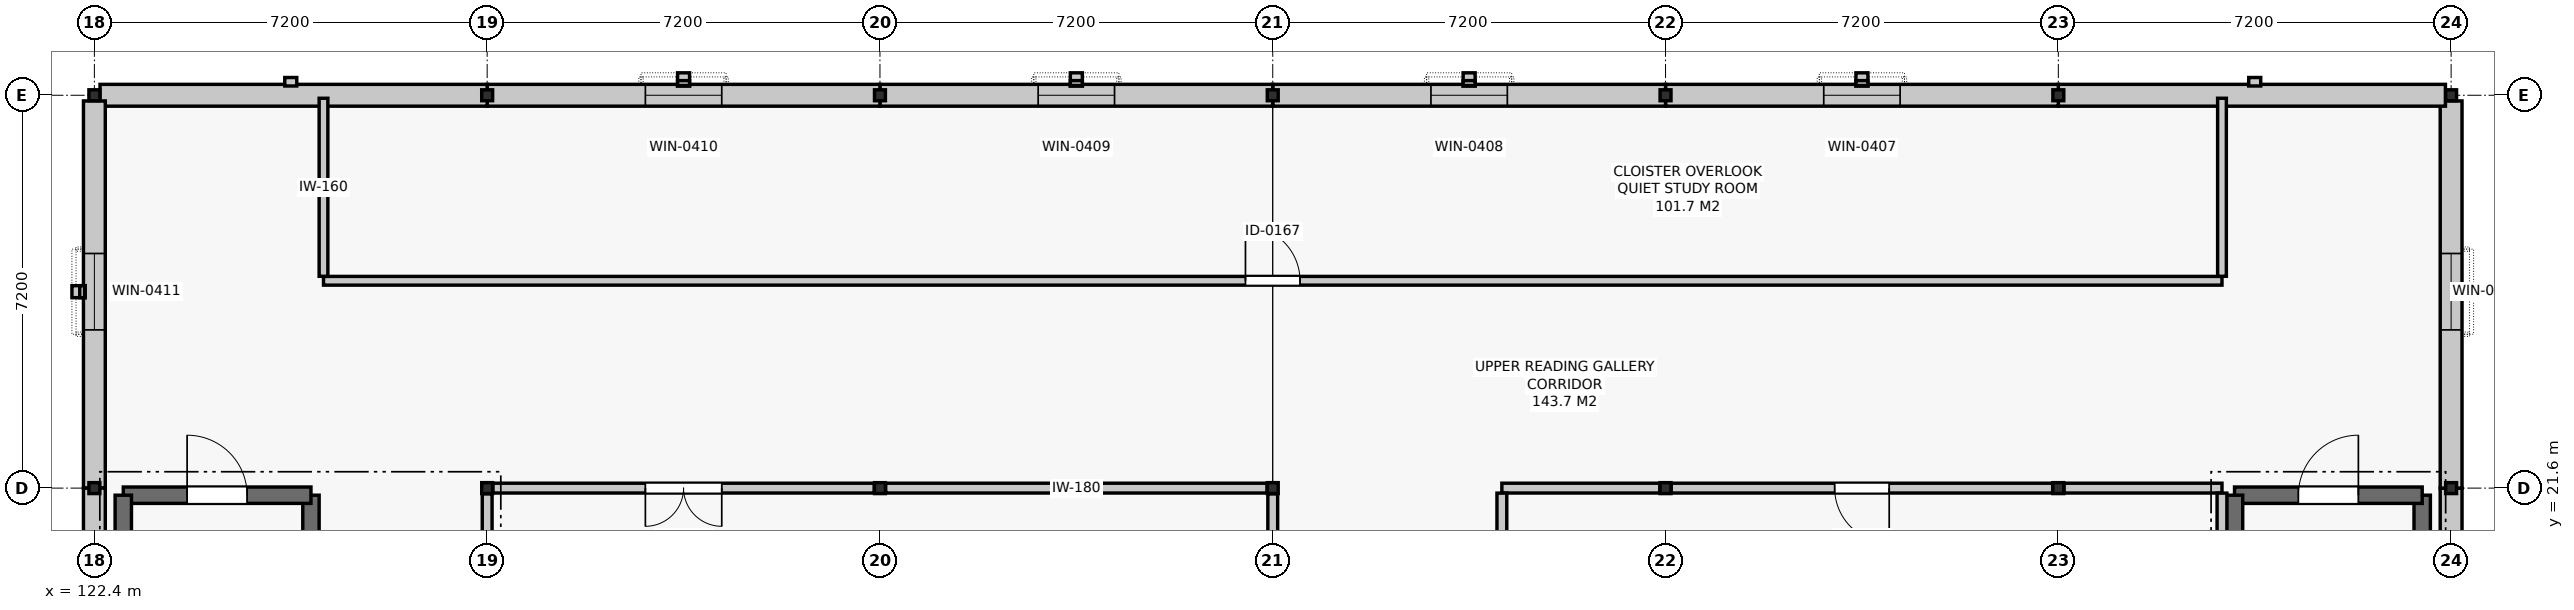
"""IFC4 building model, lengths in metres.
Left out: names, types, materials, properties, quantities, classifications, styles, units other than length and angle.
Written with IfcOpenShell. Run it as: python <this file> out.ifc"""

import sys

from ifc_helpers import new_model, si_unit, direction, frame, frame_2d, origin, origin_2d, place, context, subcontext, project, spatial, rectangle, i_section, extrude, element, fill, save


model = new_model("IFC4")
c1 = context("Model", 3, precision=1e-05, world=origin(), true_north=direction((0.0, 1.0)))
c2 = subcontext(c1, "Body", "Model", "MODEL_VIEW")
j1 = project(units=[si_unit("LENGTHUNIT", "METRE"), si_unit("PLANEANGLEUNIT", "RADIAN")], contexts=[c1])
p1 = place(None, origin())
s1 = spatial("IfcSite", under=j1, at=p1, CompositionType="ELEMENT")
p2 = place(p1, origin())
s2 = spatial("IfcBuilding", under=s1, at=p2, CompositionType="ELEMENT")
p3 = place(p2, frame((0.0, 0.0, 14.4)))
s3 = spatial("IfcBuildingStorey", under=s2, at=p3, CompositionType="ELEMENT", Elevation=14.4)
for number, where, z_axis, x_axis in (
    (1, (122.4, 21.6, 0.0), (0.0, 0.0, 1.0), (1.0, 0.0, 0.0)),
    (2, (122.4, 28.8, 0.0), (0.0, 0.0, 1.0), (1.0, 0.0, 0.0)),
    (3, (129.6, 21.6, 0.0), (0.0, 0.0, 1.0), (1.0, 0.0, 0.0)),
    (4, (129.6, 28.8, 0.0), (0.0, 0.0, 1.0), (1.0, 0.0, 0.0)),
    (5, (136.8, 21.6, 0.0), (0.0, 0.0, 1.0), (1.0, 0.0, 0.0)),
    (6, (136.8, 28.8, 0.0), (0.0, 0.0, 1.0), (1.0, 0.0, 0.0)),
    (7, (144.0, 21.6, 0.0), (0.0, 0.0, 1.0), (1.0, 0.0, 0.0)),
    (8, (144.0, 28.8, 0.0), (0.0, 0.0, 1.0), (1.0, 0.0, 0.0)),
    (9, (151.2, 21.6, 0.0), (0.0, 0.0, 1.0), (1.0, 0.0, 0.0)),
    (10, (151.2, 28.8, 0.0), (0.0, 0.0, 1.0), (1.0, 0.0, 0.0)),
    (11, (158.4, 21.6, 0.0), (0.0, 0.0, 1.0), (1.0, 0.0, 0.0)),
    (12, (158.4, 28.8, 0.0), (0.0, 0.0, 1.0), (1.0, 0.0, 0.0)),
    (13, (165.6, 21.6, 0.0), (0.0, 0.0, 1.0), (1.0, 0.0, 0.0)),
    (14, (165.6, 28.8, 0.0), (0.0, 0.0, 1.0), (1.0, 0.0, 0.0)),
):
    element("IfcColumn", number, at=place(p3, frame(where, z_axis=z_axis, x_axis=x_axis)), inside=s3, PredefinedType="COLUMN", context=c2, shape_type="SweptSolid", body=[
        extrude(i_section(OverallWidth=0.2, OverallDepth=0.2, WebThickness=0.009, FlangeThickness=0.015, FilletRadius=0.018, at=origin_2d()), origin(), (0.0, 0.0, 1.0), 4.2),
    ])
p4 = place(p3, frame((165.6, 14.4, 0.0), z_axis=(0.0, 0.0, 1.0), x_axis=(0.0, 1.0, 0.0)))
e15 = element("IfcWall", 15, at=p4, inside=s3, PredefinedType="SOLIDWALL", context=c2, shape_type="SweptSolid", body=[
    extrude(rectangle(XDim=7.2, YDim=0.4, at=frame_2d((3.6, 0.0))), origin(), (0.0, 0.0, 1.0), 3.24),
])
p5 = place(p3, frame((165.6, 21.6, 0.0), z_axis=(0.0, 0.0, 1.0), x_axis=(0.0, 1.0, 0.0)))
e16 = element("IfcWall", 16, at=p5, inside=s3, PredefinedType="SOLIDWALL", context=c2, shape_type="SweptSolid", body=[
    extrude(rectangle(XDim=7.096, YDim=0.4, at=frame_2d((3.548, 0.0))), origin(), (0.0, 0.0, 1.0), 3.24),
])
p6 = place(p5, frame((2.9, 0.0, 0.95)))
e17 = element("IfcOpeningElement", 17, at=p6, cuts=e16, PredefinedType="OPENING", context=c2, shape_type="SweptSolid", body=[
    extrude(rectangle(XDim=1.4, YDim=1.85, at=frame_2d((0.7, 0.925))), frame((0.0, 0.212, 0.0), z_axis=(0.0, -1.0, 0.0), x_axis=(1.0, 0.0, 0.0)), (0.0, 0.0, 1.0), 0.424),
])
p7 = place(p3, frame((165.496, 28.8, 0.0), z_axis=(0.0, 0.0, 1.0), x_axis=(-1.0, 0.0, 0.0)))
e18 = element("IfcWall", 18, at=p7, inside=s3, PredefinedType="SOLIDWALL", context=c2, shape_type="SweptSolid", body=[
    extrude(rectangle(XDim=7.096, YDim=0.4, at=frame_2d((3.548, 0.0))), origin(), (0.0, 0.0, 1.0), 3.24),
])
p8 = place(p3, frame((158.4, 28.8, 0.0), z_axis=(0.0, 0.0, 1.0), x_axis=(-1.0, 0.0, 0.0)))
e19 = element("IfcWall", 19, at=p8, inside=s3, PredefinedType="SOLIDWALL", context=c2, shape_type="SweptSolid", body=[
    extrude(rectangle(XDim=7.2, YDim=0.4, at=frame_2d((3.6, 0.0))), origin(), (0.0, 0.0, 1.0), 3.24),
])
p9 = place(p8, frame((2.9, 0.0, 0.95)))
e20 = element("IfcOpeningElement", 20, at=p9, cuts=e19, PredefinedType="OPENING", context=c2, shape_type="SweptSolid", body=[
    extrude(rectangle(XDim=1.4, YDim=1.85, at=frame_2d((0.7, 0.925))), frame((0.0, 0.212, 0.0), z_axis=(0.0, -1.0, 0.0), x_axis=(1.0, 0.0, 0.0)), (0.0, 0.0, 1.0), 0.424),
])
p10 = place(p3, frame((151.2, 28.8, 0.0), z_axis=(0.0, 0.0, 1.0), x_axis=(-1.0, 0.0, 0.0)))
e21 = element("IfcWall", 21, at=p10, inside=s3, PredefinedType="SOLIDWALL", context=c2, shape_type="SweptSolid", body=[
    extrude(rectangle(XDim=7.2, YDim=0.4, at=frame_2d((3.6, 0.0))), origin(), (0.0, 0.0, 1.0), 3.24),
])
p11 = place(p10, frame((2.9, 0.0, 0.95)))
e22 = element("IfcOpeningElement", 22, at=p11, cuts=e21, PredefinedType="OPENING", context=c2, shape_type="SweptSolid", body=[
    extrude(rectangle(XDim=1.4, YDim=1.85, at=frame_2d((0.7, 0.925))), frame((0.0, 0.212, 0.0), z_axis=(0.0, -1.0, 0.0), x_axis=(1.0, 0.0, 0.0)), (0.0, 0.0, 1.0), 0.424),
])
p12 = place(p3, frame((144.0, 28.8, 0.0), z_axis=(0.0, 0.0, 1.0), x_axis=(-1.0, 0.0, 0.0)))
e23 = element("IfcWall", 23, at=p12, inside=s3, PredefinedType="SOLIDWALL", context=c2, shape_type="SweptSolid", body=[
    extrude(rectangle(XDim=7.2, YDim=0.4, at=frame_2d((3.6, 0.0))), origin(), (0.0, 0.0, 1.0), 3.24),
])
p13 = place(p12, frame((2.9, 0.0, 0.95)))
e24 = element("IfcOpeningElement", 24, at=p13, cuts=e23, PredefinedType="OPENING", context=c2, shape_type="SweptSolid", body=[
    extrude(rectangle(XDim=1.4, YDim=1.85, at=frame_2d((0.7, 0.925))), frame((0.0, 0.212, 0.0), z_axis=(0.0, -1.0, 0.0), x_axis=(1.0, 0.0, 0.0)), (0.0, 0.0, 1.0), 0.424),
])
p14 = place(p3, frame((136.8, 28.8, 0.0), z_axis=(0.0, 0.0, 1.0), x_axis=(-1.0, 0.0, 0.0)))
e25 = element("IfcWall", 25, at=p14, inside=s3, PredefinedType="SOLIDWALL", context=c2, shape_type="SweptSolid", body=[
    extrude(rectangle(XDim=7.2, YDim=0.4, at=frame_2d((3.6, 0.0))), origin(), (0.0, 0.0, 1.0), 3.24),
])
p15 = place(p14, frame((2.9, 0.0, 0.95)))
e26 = element("IfcOpeningElement", 26, at=p15, cuts=e25, PredefinedType="OPENING", context=c2, shape_type="SweptSolid", body=[
    extrude(rectangle(XDim=1.4, YDim=1.85, at=frame_2d((0.7, 0.925))), frame((0.0, 0.212, 0.0), z_axis=(0.0, -1.0, 0.0), x_axis=(1.0, 0.0, 0.0)), (0.0, 0.0, 1.0), 0.424),
])
p16 = place(p3, frame((129.6, 28.8, 0.0), z_axis=(0.0, 0.0, 1.0), x_axis=(-1.0, 0.0, 0.0)))
e27 = element("IfcWall", 27, at=p16, inside=s3, PredefinedType="SOLIDWALL", context=c2, shape_type="SweptSolid", body=[
    extrude(rectangle(XDim=7.096, YDim=0.4, at=frame_2d((3.548, 0.0))), origin(), (0.0, 0.0, 1.0), 3.24),
])
p17 = place(p3, frame((122.4, 28.696, 0.0), z_axis=(0.0, 0.0, 1.0), x_axis=(0.0, -1.0, 0.0)))
e28 = element("IfcWall", 28, at=p17, inside=s3, PredefinedType="SOLIDWALL", context=c2, shape_type="SweptSolid", body=[
    extrude(rectangle(XDim=7.096, YDim=0.4, at=frame_2d((3.548, 0.0))), origin(), (0.0, 0.0, 1.0), 3.24),
])
p18 = place(p17, frame((2.796, 0.0, 0.95)))
e29 = element("IfcOpeningElement", 29, at=p18, cuts=e28, PredefinedType="OPENING", context=c2, shape_type="SweptSolid", body=[
    extrude(rectangle(XDim=1.4, YDim=1.85, at=frame_2d((0.7, 0.925))), frame((0.0, 0.212, 0.0), z_axis=(0.0, -1.0, 0.0), x_axis=(1.0, 0.0, 0.0)), (0.0, 0.0, 1.0), 0.424),
])
p19 = place(p3, frame((122.4, 21.6, 0.0), z_axis=(0.0, 0.0, 1.0), x_axis=(0.0, -1.0, 0.0)))
e30 = element("IfcWall", 30, at=p19, inside=s3, PredefinedType="SOLIDWALL", context=c2, shape_type="SweptSolid", body=[
    extrude(rectangle(XDim=7.2, YDim=0.4, at=frame_2d((3.6, 0.0))), origin(), (0.0, 0.0, 1.0), 3.24),
])
p20 = place(p19, frame((2.9, 0.0, 0.95)))
e31 = element("IfcOpeningElement", 31, at=p20, cuts=e30, PredefinedType="OPENING", context=c2, shape_type="SweptSolid", body=[
    extrude(rectangle(XDim=1.4, YDim=1.85, at=frame_2d((0.7, 0.925))), frame((0.0, 0.212, 0.0), z_axis=(0.0, -1.0, 0.0), x_axis=(1.0, 0.0, 0.0)), (0.0, 0.0, 1.0), 0.424),
])
p21 = place(p3, frame((126.37, 14.43, 0.0), z_axis=(0.0, 0.0, 1.0), x_axis=(0.0, 1.0, 0.0)))
e32 = element("IfcWall", 32, at=p21, inside=s3, PredefinedType="SHEAR", context=c2, shape_type="SweptSolid", body=[
    extrude(rectangle(XDim=7.04, YDim=0.3, at=frame_2d((3.52, 0.0))), origin(), (0.0, 0.0, 1.0), 3.96),
])
p22 = place(p3, frame((126.37, 21.47, 0.0), z_axis=(0.0, 0.0, 1.0), x_axis=(-1.0, 0.0, 0.0)))
e33 = element("IfcWall", 33, at=p22, inside=s3, PredefinedType="SHEAR", context=c2, shape_type="SweptSolid", body=[
    extrude(rectangle(XDim=3.44, YDim=0.3, at=frame_2d((1.72, 0.0))), origin(), (0.0, 0.0, 1.0), 3.96),
])
p23 = place(p22, frame((1.17, 0.0, 0.0)))
e34 = element("IfcOpeningElement", 34, at=p23, cuts=e33, PredefinedType="OPENING", context=c2, shape_type="SweptSolid", body=[
    extrude(rectangle(XDim=1.1, YDim=2.15, at=frame_2d((0.55, 1.075))), frame((0.0, 0.162, 0.0), z_axis=(0.0, -1.0, 0.0), x_axis=(1.0, 0.0, 0.0)), (0.0, 0.0, 1.0), 0.324),
])
for number, where, z_axis, x_axis in (
    (35, (122.93, 21.47, 0.0), (0.0, 0.0, 1.0), (0.0, -1.0, 0.0)),
    (36, (165.07, 14.43, 0.0), (0.0, 0.0, 1.0), (0.0, 1.0, 0.0)),
):
    element("IfcWall", number, at=place(p3, frame(where, z_axis=z_axis, x_axis=x_axis)), inside=s3, PredefinedType="SHEAR", context=c2, shape_type="SweptSolid", body=[
        extrude(rectangle(XDim=7.04, YDim=0.3, at=frame_2d((3.52, 0.0))), origin(), (0.0, 0.0, 1.0), 3.96),
    ])
p24 = place(p3, frame((165.07, 21.47, 0.0), z_axis=(0.0, 0.0, 1.0), x_axis=(-1.0, 0.0, 0.0)))
e37 = element("IfcWall", 37, at=p24, inside=s3, PredefinedType="SHEAR", context=c2, shape_type="SweptSolid", body=[
    extrude(rectangle(XDim=3.44, YDim=0.3, at=frame_2d((1.72, 0.0))), origin(), (0.0, 0.0, 1.0), 3.96),
])
p25 = place(p24, frame((1.17, 0.0, 0.0)))
e38 = element("IfcOpeningElement", 38, at=p25, cuts=e37, PredefinedType="OPENING", context=c2, shape_type="SweptSolid", body=[
    extrude(rectangle(XDim=1.1, YDim=2.15, at=frame_2d((0.55, 1.075))), frame((0.0, 0.162, 0.0), z_axis=(0.0, -1.0, 0.0), x_axis=(1.0, 0.0, 0.0)), (0.0, 0.0, 1.0), 0.324),
])
p26 = place(p3, frame((161.63, 21.47, 0.0), z_axis=(0.0, 0.0, 1.0), x_axis=(0.0, -1.0, 0.0)))
e39 = element("IfcWall", 39, at=p26, inside=s3, PredefinedType="SHEAR", context=c2, shape_type="SweptSolid", body=[
    extrude(rectangle(XDim=7.04, YDim=0.3, at=frame_2d((3.52, 0.0))), origin(), (0.0, 0.0, 1.0), 3.96),
])
p27 = place(p3, frame((129.704, 21.6, 0.0), z_axis=(0.0, 0.0, 1.0), x_axis=(1.0, 0.0, 0.0)))
e40 = element("IfcWall", 40, at=p27, inside=s3, PredefinedType="PARTITIONING", context=c2, shape_type="SweptSolid", body=[
    extrude(rectangle(XDim=6.992, YDim=0.18, at=frame_2d((3.496, 0.0))), origin(), (0.0, 0.0, 1.0), 3.245),
])
p28 = place(p27, frame((2.796, 0.0, 0.0)))
e41 = element("IfcOpeningElement", 41, at=p28, cuts=e40, PredefinedType="OPENING", context=c2, shape_type="SweptSolid", body=[
    extrude(rectangle(XDim=1.4, YDim=2.2, at=frame_2d((0.7, 1.1))), frame((0.0, 0.102, 0.0), z_axis=(0.0, -1.0, 0.0), x_axis=(1.0, 0.0, 0.0)), (0.0, 0.0, 1.0), 0.204),
])
p29 = place(p3, frame((136.904, 21.6, 0.0), z_axis=(0.0, 0.0, 1.0), x_axis=(1.0, 0.0, 0.0)))
e42 = element("IfcWall", 42, at=p29, inside=s3, PredefinedType="PARTITIONING", context=c2, shape_type="SweptSolid", body=[
    extrude(rectangle(XDim=6.992, YDim=0.18, at=frame_2d((3.496, 0.0))), origin(), (0.0, 0.0, 1.0), 3.245),
])
p30 = place(p3, frame((126.6, 25.4, 0.0), z_axis=(0.0, 0.0, 1.0), x_axis=(1.0, 0.0, 0.0)))
e43 = element("IfcWall", 43, at=p30, inside=s3, PredefinedType="PARTITIONING", context=c2, shape_type="SweptSolid", body=[
    extrude(rectangle(XDim=34.8, YDim=0.16, at=frame_2d((17.4, 0.0))), origin(), (0.0, 0.0, 1.0), 3.595),
])
p31 = place(p30, frame((16.9, 0.0, 0.0)))
e44 = element("IfcOpeningElement", 44, at=p31, cuts=e43, PredefinedType="OPENING", context=c2, shape_type="SweptSolid", body=[
    extrude(rectangle(XDim=1.0, YDim=2.15, at=frame_2d((0.5, 1.075))), frame((0.0, 0.092, 0.0), z_axis=(0.0, -1.0, 0.0), x_axis=(1.0, 0.0, 0.0)), (0.0, 0.0, 1.0), 0.184),
])
p32 = place(p3, frame((148.2, 21.6, 0.0), z_axis=(0.0, 0.0, 1.0), x_axis=(1.0, 0.0, 0.0)))
e45 = element("IfcWall", 45, at=p32, inside=s3, PredefinedType="PARTITIONING", context=c2, shape_type="SweptSolid", body=[
    extrude(rectangle(XDim=2.896, YDim=0.18, at=frame_2d((1.448, 0.0))), origin(), (0.0, 0.0, 1.0), 3.595),
])
p33 = place(p3, frame((151.304, 21.6, 0.0), z_axis=(0.0, 0.0, 1.0), x_axis=(1.0, 0.0, 0.0)))
e46 = element("IfcWall", 46, at=p33, inside=s3, PredefinedType="PARTITIONING", context=c2, shape_type="SweptSolid", body=[
    extrude(rectangle(XDim=6.992, YDim=0.18, at=frame_2d((3.496, 0.0))), origin(), (0.0, 0.0, 1.0), 3.595),
])
p34 = place(p33, frame((2.996, 0.0, 0.0)))
e47 = element("IfcOpeningElement", 47, at=p34, cuts=e46, PredefinedType="OPENING", context=c2, shape_type="SweptSolid", body=[
    extrude(rectangle(XDim=1.0, YDim=2.15, at=frame_2d((0.5, 1.075))), frame((0.0, 0.102, 0.0), z_axis=(0.0, -1.0, 0.0), x_axis=(1.0, 0.0, 0.0)), (0.0, 0.0, 1.0), 0.204),
])
p35 = place(p3, frame((158.504, 21.6, 0.0), z_axis=(0.0, 0.0, 1.0), x_axis=(1.0, 0.0, 0.0)))
e48 = element("IfcWall", 48, at=p35, inside=s3, PredefinedType="PARTITIONING", context=c2, shape_type="SweptSolid", body=[
    extrude(rectangle(XDim=2.896, YDim=0.18, at=frame_2d((1.448, 0.0))), origin(), (0.0, 0.0, 1.0), 3.595),
])
for number, where, z_axis, x_axis in (
    (49, (129.6, 14.504, 0.0), (0.0, 0.0, 1.0), (0.0, 1.0, 0.0)),
    (50, (144.0, 14.504, 0.0), (0.0, 0.0, 1.0), (0.0, 1.0, 0.0)),
):
    element("IfcWall", number, at=place(p3, frame(where, z_axis=z_axis, x_axis=x_axis)), inside=s3, PredefinedType="PARTITIONING", context=c2, shape_type="SweptSolid", body=[
        extrude(rectangle(XDim=6.992, YDim=0.18, at=frame_2d((3.496, 0.0))), origin(), (0.0, 0.0, 1.0), 3.055),
    ])
for number, where, z_axis, x_axis in (
    (51, (126.6, 25.482, 0.0), (0.0, 0.0, 1.0), (0.0, 1.0, 0.0)),
    (52, (161.4, 25.482, 0.0), (0.0, 0.0, 1.0), (0.0, 1.0, 0.0)),
):
    element("IfcWall", number, at=place(p3, frame(where, z_axis=z_axis, x_axis=x_axis)), inside=s3, PredefinedType="PARTITIONING", context=c2, shape_type="SweptSolid", body=[
        extrude(rectangle(XDim=3.263, YDim=0.16, at=frame_2d((1.632, 0.0))), origin(), (0.0, 0.0, 1.0), 3.395),
    ])
p36 = place(p3, frame((148.2, 18.077, 0.0), z_axis=(0.0, 0.0, 1.0), x_axis=(0.0, 1.0, 0.0)))
e53 = element("IfcWall", 53, at=p36, inside=s3, PredefinedType="PARTITIONING", context=c2, shape_type="SweptSolid", body=[
    extrude(rectangle(XDim=3.431, YDim=0.18, at=frame_2d((1.716, 0.0))), origin(), (0.0, 0.0, 1.0), 3.695),
])
p37 = place(p3, frame((161.4, 18.092, 0.0), z_axis=(0.0, 0.0, 1.0), x_axis=(0.0, 1.0, 0.0)))
e54 = element("IfcWall", 54, at=p37, inside=s3, PredefinedType="PARTITIONING", context=c2, shape_type="SweptSolid", body=[
    extrude(rectangle(XDim=3.416, YDim=0.18, at=frame_2d((1.708, 0.0))), origin(), (0.0, 0.0, 1.0), 3.695),
])
p38 = place(p6, origin())
e55 = element("IfcWindow", 55, at=p38, inside=s3, PartitioningType="SINGLE_PANEL", PredefinedType="WINDOW", context=c2, shape_type="SweptSolid", body=[
    extrude(rectangle(XDim=1.4, YDim=1.85, at=frame_2d((0.7, 0.925))), frame((0.0, 0.03, 0.0), z_axis=(0.0, -1.0, 0.0), x_axis=(1.0, 0.0, 0.0)), (0.0, 0.0, 1.0), 0.06),
])
fill(e17, e55)
p39 = place(p9, origin())
e56 = element("IfcWindow", 56, at=p39, inside=s3, PartitioningType="SINGLE_PANEL", PredefinedType="WINDOW", context=c2, shape_type="SweptSolid", body=[
    extrude(rectangle(XDim=1.4, YDim=1.85, at=frame_2d((0.7, 0.925))), frame((0.0, 0.03, 0.0), z_axis=(0.0, -1.0, 0.0), x_axis=(1.0, 0.0, 0.0)), (0.0, 0.0, 1.0), 0.06),
])
fill(e20, e56)
p40 = place(p11, origin())
e57 = element("IfcWindow", 57, at=p40, inside=s3, PartitioningType="SINGLE_PANEL", PredefinedType="WINDOW", context=c2, shape_type="SweptSolid", body=[
    extrude(rectangle(XDim=1.4, YDim=1.85, at=frame_2d((0.7, 0.925))), frame((0.0, 0.03, 0.0), z_axis=(0.0, -1.0, 0.0), x_axis=(1.0, 0.0, 0.0)), (0.0, 0.0, 1.0), 0.06),
])
fill(e22, e57)
p41 = place(p13, origin())
e58 = element("IfcWindow", 58, at=p41, inside=s3, PartitioningType="SINGLE_PANEL", PredefinedType="WINDOW", context=c2, shape_type="SweptSolid", body=[
    extrude(rectangle(XDim=1.4, YDim=1.85, at=frame_2d((0.7, 0.925))), frame((0.0, 0.03, 0.0), z_axis=(0.0, -1.0, 0.0), x_axis=(1.0, 0.0, 0.0)), (0.0, 0.0, 1.0), 0.06),
])
fill(e24, e58)
p42 = place(p15, origin())
e59 = element("IfcWindow", 59, at=p42, inside=s3, PartitioningType="SINGLE_PANEL", PredefinedType="WINDOW", context=c2, shape_type="SweptSolid", body=[
    extrude(rectangle(XDim=1.4, YDim=1.85, at=frame_2d((0.7, 0.925))), frame((0.0, 0.03, 0.0), z_axis=(0.0, -1.0, 0.0), x_axis=(1.0, 0.0, 0.0)), (0.0, 0.0, 1.0), 0.06),
])
fill(e26, e59)
p43 = place(p18, origin())
e60 = element("IfcWindow", 60, at=p43, inside=s3, PartitioningType="SINGLE_PANEL", PredefinedType="WINDOW", context=c2, shape_type="SweptSolid", body=[
    extrude(rectangle(XDim=1.4, YDim=1.85, at=frame_2d((0.7, 0.925))), frame((0.0, 0.03, 0.0), z_axis=(0.0, -1.0, 0.0), x_axis=(1.0, 0.0, 0.0)), (0.0, 0.0, 1.0), 0.06),
])
fill(e29, e60)
p44 = place(p23, frame((1.1, 0.0, 0.0), z_axis=(0.0, 0.0, 1.0), x_axis=(-1.0, 0.0, 0.0)))
e61 = element("IfcDoor", 61, at=p44, inside=s3, OperationType="SINGLE_SWING_LEFT", PredefinedType="DOOR", context=c2, shape_type="SweptSolid", body=[
    extrude(rectangle(XDim=1.1, YDim=2.15, at=frame_2d((0.55, 1.075))), frame((0.0, 0.025, 0.0), z_axis=(0.0, -1.0, 0.0), x_axis=(1.0, 0.0, 0.0)), (0.0, 0.0, 1.0), 0.05),
])
fill(e34, e61)
p45 = place(p25, frame((1.1, 0.0, 0.0), z_axis=(0.0, 0.0, 1.0), x_axis=(-1.0, 0.0, 0.0)))
e62 = element("IfcDoor", 62, at=p45, inside=s3, OperationType="SINGLE_SWING_RIGHT", PredefinedType="DOOR", context=c2, shape_type="SweptSolid", body=[
    extrude(rectangle(XDim=1.1, YDim=2.15, at=frame_2d((0.55, 1.075))), frame((0.0, 0.025, 0.0), z_axis=(0.0, -1.0, 0.0), x_axis=(1.0, 0.0, 0.0)), (0.0, 0.0, 1.0), 0.05),
])
fill(e38, e62)
p46 = place(p28, frame((1.4, 0.0, 0.0), z_axis=(0.0, 0.0, 1.0), x_axis=(-1.0, 0.0, 0.0)))
e63 = element("IfcDoor", 63, at=p46, inside=s3, OperationType="DOUBLE_DOOR_SINGLE_SWING", PredefinedType="DOOR", context=c2, shape_type="SweptSolid", body=[
    extrude(rectangle(XDim=1.4, YDim=2.2, at=frame_2d((0.7, 1.1))), frame((0.0, 0.025, 0.0), z_axis=(0.0, -1.0, 0.0), x_axis=(1.0, 0.0, 0.0)), (0.0, 0.0, 1.0), 0.05),
])
fill(e41, e63)
p47 = place(p31, origin())
e64 = element("IfcDoor", 64, at=p47, inside=s3, OperationType="SINGLE_SWING_LEFT", PredefinedType="DOOR", context=c2, shape_type="SweptSolid", body=[
    extrude(rectangle(XDim=1.0, YDim=2.15, at=frame_2d((0.5, 1.075))), frame((0.0, 0.025, 0.0), z_axis=(0.0, -1.0, 0.0), x_axis=(1.0, 0.0, 0.0)), (0.0, 0.0, 1.0), 0.05),
])
fill(e44, e64)
p48 = place(p34, frame((1.0, 0.0, 0.0), z_axis=(0.0, 0.0, 1.0), x_axis=(-1.0, 0.0, 0.0)))
e65 = element("IfcDoor", 65, at=p48, inside=s3, OperationType="SINGLE_SWING_LEFT", PredefinedType="DOOR", context=c2, shape_type="SweptSolid", body=[
    extrude(rectangle(XDim=1.0, YDim=2.15, at=frame_2d((0.5, 1.075))), frame((0.0, 0.025, 0.0), z_axis=(0.0, -1.0, 0.0), x_axis=(1.0, 0.0, 0.0)), (0.0, 0.0, 1.0), 0.05),
])
fill(e47, e65)
save(model, sys.argv[1])
